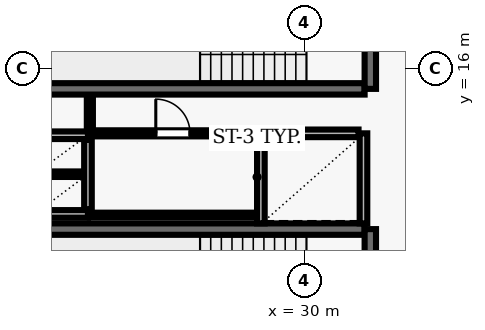
"""IFC4 building model, lengths in metres.
Left out: names, types, materials, properties, quantities, classifications, styles, units other than length and angle.
Written with IfcOpenShell. Run it as: python <this file> out.ifc"""

import sys

from ifc_helpers import new_model, si_unit, direction, frame, frame_2d, origin, place, context, subcontext, project, spatial, rectangle, extrude, element, fill, save


model = new_model("IFC4")
c1 = context("Model", 3, precision=1e-05, world=origin(), true_north=direction((0.0, 1.0)))
c2 = subcontext(c1, "Body", "Model", "MODEL_VIEW")
j1 = project(units=[si_unit("LENGTHUNIT", "METRE"), si_unit("PLANEANGLEUNIT", "RADIAN")], contexts=[c1])
p1 = place(None, origin())
s1 = spatial("IfcSite", under=j1, at=p1, CompositionType="ELEMENT")
p2 = place(p1, origin())
s2 = spatial("IfcBuilding", under=s1, at=p2, CompositionType="ELEMENT")
p3 = place(p2, frame((0.0, 0.0, 50.5)))
s3 = spatial("IfcBuildingStorey", under=s2, at=p3, CompositionType="ELEMENT", Elevation=50.5)
p4 = place(p3, frame((23.22, 15.47, 0.0), z_axis=(0.0, 0.0, 1.0), x_axis=(1.0, 0.0, 0.0)))
e1 = element("IfcWall", 1, at=p4, inside=s3, PredefinedType="SHEAR", context=c2, shape_type="SweptSolid", body=[
    extrude(rectangle(XDim=8.36, YDim=0.3, at=frame_2d((4.18, 0.0))), origin(), (0.0, 0.0, 1.0), 3.69),
])
p5 = place(p3, frame((31.73, 15.47, 0.0), z_axis=(0.0, 0.0, 1.0), x_axis=(0.0, 1.0, 0.0)))
e2 = element("IfcWall", 2, at=p5, inside=s3, PredefinedType="SHEAR", context=c2, shape_type="SweptSolid", body=[
    extrude(rectangle(XDim=3.51, YDim=0.3, at=frame_2d((1.755, 0.0))), origin(), (0.0, 0.0, 1.0), 3.69),
])
p6 = place(p5, frame((1.18, 0.0, 0.0)))
e3 = element("IfcOpeningElement", 3, at=p6, cuts=e2, PredefinedType="OPENING", context=c2, shape_type="SweptSolid", body=[
    extrude(rectangle(XDim=1.15, YDim=2.15, at=frame_2d((0.575, 1.075))), frame((0.0, 0.16, 0.0), z_axis=(0.0, -1.0, 0.0), x_axis=(1.0, 0.0, 0.0)), (0.0, 0.0, 1.0), 0.32),
])
p7 = place(p3, frame((31.58, 11.78, 0.0), z_axis=(0.0, 0.0, 1.0), x_axis=(-1.0, 0.0, 0.0)))
e4 = element("IfcWall", 4, at=p7, inside=s3, PredefinedType="SHEAR", context=c2, shape_type="SweptSolid", body=[
    extrude(rectangle(XDim=8.36, YDim=0.3, at=frame_2d((4.18, 0.0))), origin(), (0.0, 0.0, 1.0), 3.69),
])
p8 = place(p3, frame((31.73, 8.27, 0.0), z_axis=(0.0, 0.0, 1.0), x_axis=(0.0, 1.0, 0.0)))
e5 = element("IfcWall", 5, at=p8, inside=s3, PredefinedType="SHEAR", context=c2, shape_type="SweptSolid", body=[
    extrude(rectangle(XDim=3.51, YDim=0.3, at=frame_2d((1.755, 0.0))), origin(), (0.0, 0.0, 1.0), 3.69),
])
p9 = place(p8, frame((1.18, 0.0, 0.0)))
e6 = element("IfcOpeningElement", 6, at=p9, cuts=e5, PredefinedType="OPENING", context=c2, shape_type="SweptSolid", body=[
    extrude(rectangle(XDim=1.15, YDim=2.15, at=frame_2d((0.575, 1.075))), frame((0.0, 0.16, 0.0), z_axis=(0.0, -1.0, 0.0), x_axis=(1.0, 0.0, 0.0)), (0.0, 0.0, 1.0), 0.32),
])
for number, where, z_axis, x_axis in (
    (7, (28.85, 14.3, 0.0), (0.0, 0.0, 1.0), (0.0, -1.0, 0.0)),
    (8, (31.55, 11.93, 0.0), (0.0, 0.0, 1.0), (0.0, 1.0, 0.0)),
):
    element("IfcWall", number, at=place(p3, frame(where, z_axis=z_axis, x_axis=x_axis)), inside=s3, PredefinedType="SOLIDWALL", context=c2, shape_type="SweptSolid", body=[
        extrude(rectangle(XDim=2.37, YDim=0.2, at=frame_2d((1.185, 0.0))), origin(), (0.0, 0.0, 1.0), 3.69),
    ])
p10 = place(p3, frame((31.42, 14.3, 0.0), z_axis=(0.0, 0.0, 1.0), x_axis=(-1.0, 0.0, 0.0)))
e9 = element("IfcWall", 9, at=p10, inside=s3, PredefinedType="SOLIDWALL", context=c2, shape_type="SweptSolid", body=[
    extrude(rectangle(XDim=2.44, YDim=0.2, at=frame_2d((1.22, 0.0))), origin(), (0.0, 0.0, 1.0), 3.69),
])
for number, where, z_axis, x_axis in (
    (10, (22.9, 14.25, 0.0), (0.0, 0.0, 1.0), (1.0, 0.0, 0.0)),
    (11, (22.9, 12.18, 0.0), (0.0, 0.0, 1.0), (1.0, 0.0, 0.0)),
):
    element("IfcWall", number, at=place(p3, frame(where, z_axis=z_axis, x_axis=x_axis)), inside=s3, PredefinedType="SOLIDWALL", context=c2, shape_type="SweptSolid", body=[
        extrude(rectangle(XDim=1.4, YDim=0.2, at=frame_2d((0.7, 0.0))), origin(), (0.0, 0.0, 1.0), 3.69),
    ])
p11 = place(p3, frame((24.3, 12.3, 0.0), z_axis=(0.0, 0.0, 1.0), x_axis=(0.0, 1.0, 0.0)))
e12 = element("IfcWall", 12, at=p11, inside=s3, PredefinedType="SOLIDWALL", context=c2, shape_type="SweptSolid", body=[
    extrude(rectangle(XDim=1.83, YDim=0.2, at=frame_2d((0.915, 0.0))), origin(), (0.0, 0.0, 1.0), 3.69),
])
p12 = place(p3, frame((23.01, 13.225, 0.0), z_axis=(0.0, 0.0, 1.0), x_axis=(1.0, 0.0, 0.0)))
e13 = element("IfcWall", 13, at=p12, inside=s3, PredefinedType="PARTITIONING", context=c2, shape_type="SweptSolid", body=[
    extrude(rectangle(XDim=1.18, YDim=0.145, at=frame_2d((0.59, 0.0))), origin(), (0.0, 0.0, 1.0), 3.69),
])
p13 = place(p3, frame((24.35, 12.15, 0.0), z_axis=(0.0, 0.0, 1.0), x_axis=(1.0, 0.0, 0.0)))
e14 = element("IfcWall", 14, at=p13, inside=s3, PredefinedType="PARTITIONING", context=c2, shape_type="SweptSolid", body=[
    extrude(rectangle(XDim=4.37, YDim=0.125, at=frame_2d((2.185, 0.0))), origin(), (0.0, 0.0, 1.0), 3.69),
])
p14 = place(p3, frame((24.35, 14.3, 0.0), z_axis=(0.0, 0.0, 1.0), x_axis=(1.0, 0.0, 0.0)))
e15 = element("IfcWall", 15, at=p14, inside=s3, PredefinedType="PARTITIONING", context=c2, shape_type="SweptSolid", body=[
    extrude(rectangle(XDim=4.37, YDim=0.16, at=frame_2d((2.185, 0.0))), origin(), (0.0, 0.0, 1.0), 3.69),
])
p15 = place(p14, frame((1.735, 0.0, 0.0)))
e16 = element("IfcOpeningElement", 16, at=p15, cuts=e15, PredefinedType="OPENING", context=c2, shape_type="SweptSolid", body=[
    extrude(rectangle(XDim=0.9, YDim=2.1, at=frame_2d((0.45, 1.05))), frame((0.0, 0.09, 0.0), z_axis=(0.0, -1.0, 0.0), x_axis=(1.0, 0.0, 0.0)), (0.0, 0.0, 1.0), 0.18),
])
p16 = place(p3, frame((24.35, 15.29, 0.0), z_axis=(0.0, 0.0, 1.0), x_axis=(0.0, -1.0, 0.0)))
e17 = element("IfcWall", 17, at=p16, inside=s3, PredefinedType="PARTITIONING", context=c2, shape_type="SweptSolid", body=[
    extrude(rectangle(XDim=0.915, YDim=0.16, at=frame_2d((0.458, 0.0))), origin(), (0.0, 0.0, 1.0), 3.69),
])
p17 = place(p15, origin())
e18 = element("IfcDoor", 18, at=p17, inside=s3, OperationType="SINGLE_SWING_LEFT", PredefinedType="DOOR", context=c2, shape_type="SweptSolid", body=[
    extrude(rectangle(XDim=0.9, YDim=2.1, at=frame_2d((0.45, 1.05))), frame((0.0, 0.025, 0.0), z_axis=(0.0, -1.0, 0.0), x_axis=(1.0, 0.0, 0.0)), (0.0, 0.0, 1.0), 0.05),
])
fill(e16, e18)
save(model, sys.argv[1])
